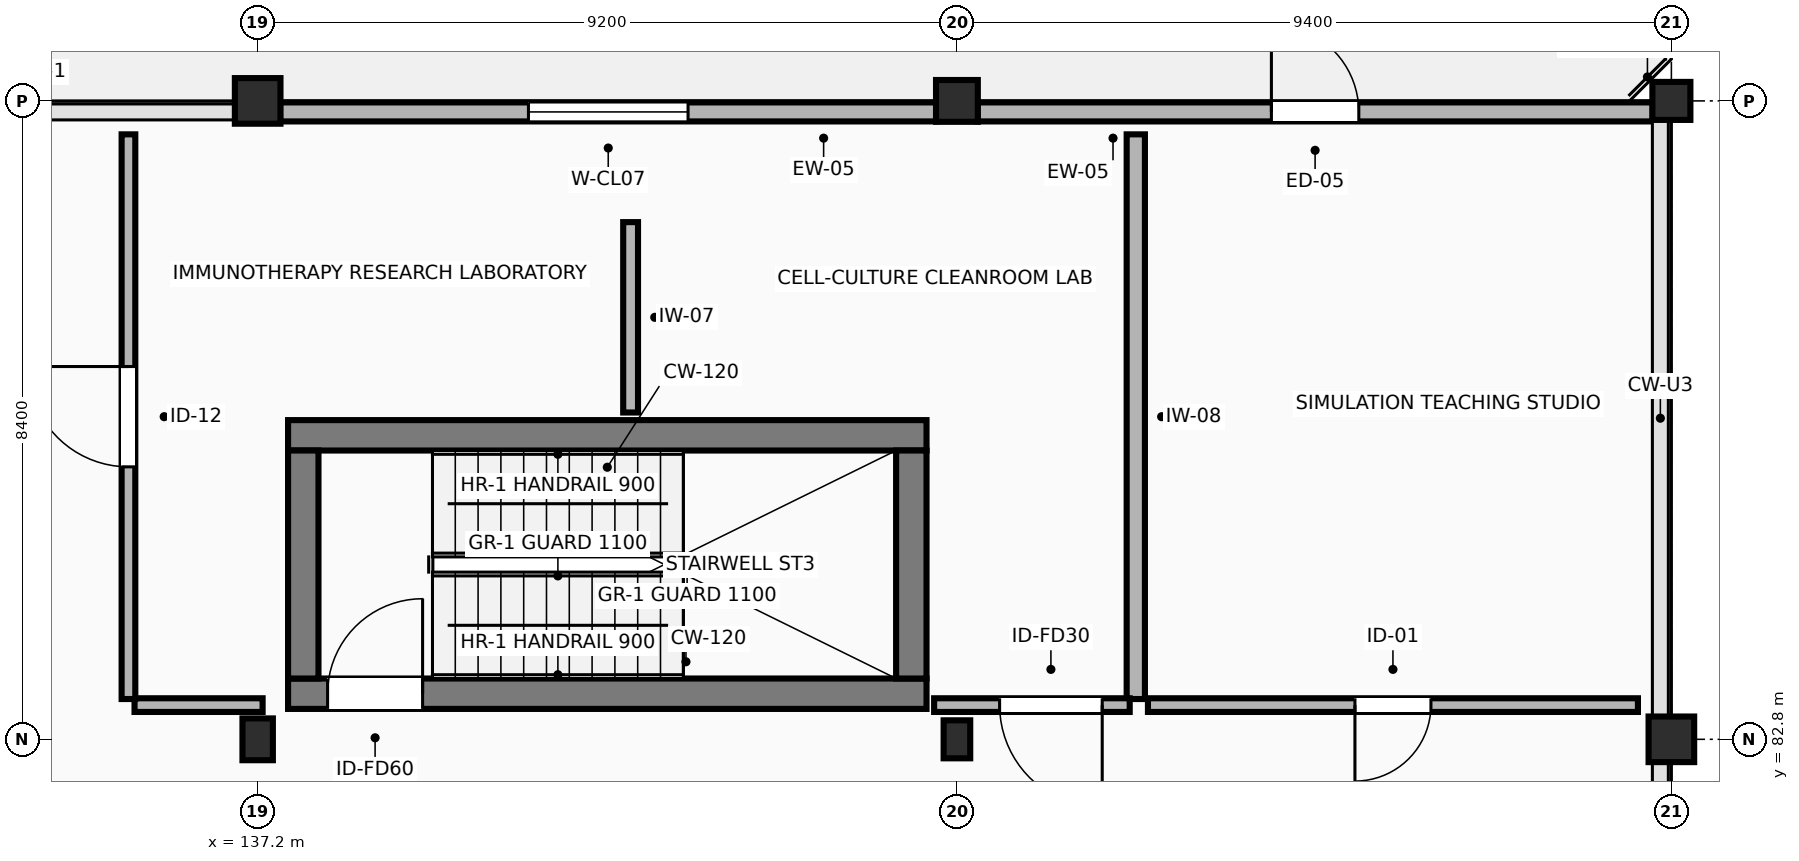
"""IFC4 building model, lengths in metres.
Left out: names, types, materials, properties, quantities, classifications, styles, units other than length and angle.
Written with IfcOpenShell. Run it as: python <this file> out.ifc"""

import sys

from ifc_helpers import new_model, si_unit, direction, frame, frame_2d, origin, origin_2d, place, context, subcontext, project, spatial, rectangle, extrude, element, fill, save


model = new_model("IFC4")
c1 = context("Model", 3, precision=1e-05, world=origin(), true_north=direction((0.0, 1.0)))
c2 = subcontext(c1, "Body", "Model", "MODEL_VIEW")
j1 = project(units=[si_unit("LENGTHUNIT", "METRE"), si_unit("PLANEANGLEUNIT", "RADIAN")], contexts=[c1])
p1 = place(None, origin())
s1 = spatial("IfcSite", under=j1, at=p1, CompositionType="ELEMENT")
p2 = place(p1, origin())
s2 = spatial("IfcBuilding", under=s1, at=p2, CompositionType="ELEMENT")
p3 = place(p2, frame((0.0, 0.0, 9.6)))
s3 = spatial("IfcBuildingStorey", under=s2, at=p3, CompositionType="ELEMENT", Elevation=9.6)
p4 = place(p3, frame((137.2, 82.8, 0.0), z_axis=(0.0, 0.0, 1.0), x_axis=(1.0, 0.0, 0.0)))
e1 = element("IfcColumn", 1, at=p4, inside=s3, PredefinedType="COLUMN", context=c2, shape_type="SweptSolid", body=[
    extrude(rectangle(XDim=0.4, YDim=0.55, at=origin_2d()), origin(), (0.0, 0.0, 1.0), 4.2),
])
p5 = place(p3, frame((137.2, 91.2, 0.0), z_axis=(0.0, 0.0, 1.0), x_axis=(1.0, 0.0, 0.0)))
e2 = element("IfcColumn", 2, at=p5, inside=s3, PredefinedType="COLUMN", context=c2, shape_type="SweptSolid", body=[
    extrude(rectangle(XDim=0.6, YDim=0.6, at=origin_2d()), origin(), (0.0, 0.0, 1.0), 4.2),
])
p6 = place(p3, frame((146.4, 82.8, 0.0), z_axis=(0.0, 0.0, 1.0), x_axis=(1.0, 0.0, 0.0)))
e3 = element("IfcColumn", 3, at=p6, inside=s3, PredefinedType="COLUMN", context=c2, shape_type="SweptSolid", body=[
    extrude(rectangle(XDim=0.35, YDim=0.5, at=origin_2d()), origin(), (0.0, 0.0, 1.0), 4.2),
])
p7 = place(p3, frame((146.4, 91.2, 0.0), z_axis=(0.0, 0.0, 1.0), x_axis=(1.0, 0.0, 0.0)))
e4 = element("IfcColumn", 4, at=p7, inside=s3, PredefinedType="COLUMN", context=c2, shape_type="SweptSolid", body=[
    extrude(rectangle(XDim=0.55, YDim=0.55, at=origin_2d()), origin(), (0.0, 0.0, 1.0), 4.2),
])
p8 = place(p3, frame((155.8, 82.8, 0.0), z_axis=(0.0, 0.0, 1.0), x_axis=(1.0, 0.0, 0.0)))
e5 = element("IfcColumn", 5, at=p8, inside=s3, PredefinedType="COLUMN", context=c2, shape_type="SweptSolid", body=[
    extrude(rectangle(XDim=0.6, YDim=0.6, at=origin_2d()), origin(), (0.0, 0.0, 1.0), 4.2),
])
p9 = place(p3, frame((155.8, 91.2, 0.0), z_axis=(0.0, 0.0, 1.0), x_axis=(1.0, 0.0, 0.0)))
e6 = element("IfcColumn", 6, at=p9, inside=s3, PredefinedType="COLUMN", context=c2, shape_type="SweptSolid", body=[
    extrude(rectangle(XDim=0.5, YDim=0.5, at=origin_2d()), origin(), (0.0, 0.0, 1.0), 4.2),
])
p10 = place(p3, frame((155.555, 91.055, 0.0), z_axis=(0.0, 0.0, 1.0), x_axis=(-1.0, 0.0, 0.0)))
e7 = element("IfcWall", 7, at=p10, inside=s3, PredefinedType="STANDARD", context=c2, shape_type="SweptSolid", body=[
    extrude(rectangle(XDim=8.885, YDim=0.25, at=frame_2d((4.442, 0.0))), origin(), (0.0, 0.0, 1.0), 3.185),
])
p11 = place(p10, frame((3.867, 0.0, 0.0)))
e8 = element("IfcOpeningElement", 8, at=p11, cuts=e7, PredefinedType="OPENING", context=c2, shape_type="SweptSolid", body=[
    extrude(rectangle(XDim=1.15, YDim=2.2, at=frame_2d((0.575, 1.1))), frame((0.0, 0.135, 0.0), z_axis=(0.0, -1.0, 0.0), x_axis=(1.0, 0.0, 0.0)), (0.0, 0.0, 1.0), 0.27),
])
p12 = place(p3, frame((146.13, 91.055, 0.0), z_axis=(0.0, 0.0, 1.0), x_axis=(-1.0, 0.0, 0.0)))
e9 = element("IfcWall", 9, at=p12, inside=s3, PredefinedType="STANDARD", context=c2, shape_type="SweptSolid", body=[
    extrude(rectangle(XDim=8.635, YDim=0.25, at=frame_2d((4.317, 0.0))), origin(), (0.0, 0.0, 1.0), 3.215),
])
p13 = place(p12, frame((3.268, 0.0, 0.95)))
e10 = element("IfcOpeningElement", 10, at=p13, cuts=e9, PredefinedType="OPENING", context=c2, shape_type="SweptSolid", body=[
    extrude(rectangle(XDim=2.1, YDim=1.8, at=frame_2d((1.05, 0.9))), frame((0.0, 0.135, 0.0), z_axis=(0.0, -1.0, 0.0), x_axis=(1.0, 0.0, 0.0)), (0.0, 0.0, 1.0), 0.27),
])
p14 = place(p3, frame((137.6, 83.4, 0.0), z_axis=(0.0, 0.0, 1.0), x_axis=(1.0, 0.0, 0.0)))
e11 = element("IfcWall", 11, at=p14, inside=s3, PredefinedType="SHEAR", context=c2, shape_type="SweptSolid", body=[
    extrude(rectangle(XDim=8.4, YDim=0.4, at=frame_2d((4.2, 0.0))), origin(), (0.0, 0.0, 1.0), 3.92),
])
p15 = place(p14, frame((0.52, 0.0, 0.0)))
e12 = element("IfcOpeningElement", 12, at=p15, cuts=e11, PredefinedType="OPENING", context=c2, shape_type="SweptSolid", body=[
    extrude(rectangle(XDim=1.25, YDim=2.2, at=frame_2d((0.625, 1.1))), frame((0.0, 0.21, 0.0), z_axis=(0.0, -1.0, 0.0), x_axis=(1.0, 0.0, 0.0)), (0.0, 0.0, 1.0), 0.42),
])
p16 = place(p3, frame((146.0, 86.8, 0.0), z_axis=(0.0, 0.0, 1.0), x_axis=(-1.0, 0.0, 0.0)))
e13 = element("IfcWall", 13, at=p16, inside=s3, PredefinedType="SHEAR", context=c2, shape_type="SweptSolid", body=[
    extrude(rectangle(XDim=8.4, YDim=0.4, at=frame_2d((4.2, 0.0))), origin(), (0.0, 0.0, 1.0), 3.92),
])
for number, where, z_axis, x_axis in (
    (14, (137.8, 83.6, 0.0), (0.0, 0.0, 1.0), (0.0, 1.0, 0.0)),
    (15, (145.8, 86.6, 0.0), (0.0, 0.0, 1.0), (0.0, -1.0, 0.0)),
):
    element("IfcWall", number, at=place(p3, frame(where, z_axis=z_axis, x_axis=x_axis)), inside=s3, PredefinedType="SHEAR", context=c2, shape_type="SweptSolid", body=[
        extrude(rectangle(XDim=3.0, YDim=0.4, at=frame_2d((1.5, 0.0))), origin(), (0.0, 0.0, 1.0), 3.92),
    ])
p17 = place(p3, frame((137.265, 83.25, 0.0), z_axis=(0.0, 0.0, 1.0), x_axis=(-1.0, 0.0, 0.0)))
e16 = element("IfcWall", 16, at=p17, inside=s3, PredefinedType="PARTITIONING", context=c2, shape_type="SweptSolid", body=[
    extrude(rectangle(XDim=1.685, YDim=0.18, at=frame_2d((0.842, 0.0))), origin(), (0.0, 0.0, 1.0), 3.255),
])
p18 = place(p3, frame((135.5, 83.33, 0.0), z_axis=(0.0, 0.0, 1.0), x_axis=(0.0, 1.0, 0.0)))
e17 = element("IfcWall", 17, at=p18, inside=s3, PredefinedType="PARTITIONING", context=c2, shape_type="SweptSolid", body=[
    extrude(rectangle(XDim=7.43, YDim=0.18, at=frame_2d((3.715, 0.0))), origin(), (0.0, 0.0, 1.0), 3.92),
])
p19 = place(p18, frame((3.055, 0.0, 0.0)))
e18 = element("IfcOpeningElement", 18, at=p19, cuts=e17, PredefinedType="OPENING", context=c2, shape_type="SweptSolid", body=[
    extrude(rectangle(XDim=1.32, YDim=2.22, at=frame_2d((0.66, 1.11))), frame((0.0, 0.1, 0.0), z_axis=(0.0, -1.0, 0.0), x_axis=(1.0, 0.0, 0.0)), (0.0, 0.0, 1.0), 0.2),
])
p20 = place(p3, frame((142.107, 89.605, 0.0), z_axis=(0.0, 0.0, 1.0), x_axis=(0.0, -1.0, 0.0)))
e19 = element("IfcWall", 19, at=p20, inside=s3, PredefinedType="PARTITIONING", context=c2, shape_type="SweptSolid", body=[
    extrude(rectangle(XDim=2.505, YDim=0.195, at=frame_2d((1.252, 0.0))), origin(), (0.0, 0.0, 1.0), 3.92),
])
p21 = place(p3, frame((148.753, 90.76, 0.0), z_axis=(0.0, 0.0, 1.0), x_axis=(0.0, -1.0, 0.0)))
e20 = element("IfcWall", 20, at=p21, inside=s3, PredefinedType="PARTITIONING", context=c2, shape_type="SweptSolid", body=[
    extrude(rectangle(XDim=7.43, YDim=0.24, at=frame_2d((3.715, 0.0))), origin(), (0.0, 0.0, 1.0), 3.92),
])
p22 = place(p3, frame((148.673, 83.25, 0.0), z_axis=(0.0, 0.0, 1.0), x_axis=(-1.0, 0.0, 0.0)))
e21 = element("IfcWall", 21, at=p22, inside=s3, PredefinedType="PARTITIONING", context=c2, shape_type="SweptSolid", body=[
    extrude(rectangle(XDim=2.573, YDim=0.18, at=frame_2d((1.287, 0.0))), origin(), (0.0, 0.0, 1.0), 3.225),
])
p23 = place(p22, frame((0.362, 0.0, 0.0)))
e22 = element("IfcOpeningElement", 22, at=p23, cuts=e21, PredefinedType="OPENING", context=c2, shape_type="SweptSolid", body=[
    extrude(rectangle(XDim=1.35, YDim=2.2, at=frame_2d((0.675, 1.1))), frame((0.0, 0.1, 0.0), z_axis=(0.0, -1.0, 0.0), x_axis=(1.0, 0.0, 0.0)), (0.0, 0.0, 1.0), 0.2),
])
p24 = place(p3, frame((155.36, 83.25, 0.0), z_axis=(0.0, 0.0, 1.0), x_axis=(-1.0, 0.0, 0.0)))
e23 = element("IfcWall", 23, at=p24, inside=s3, PredefinedType="PARTITIONING", context=c2, shape_type="SweptSolid", body=[
    extrude(rectangle(XDim=6.447, YDim=0.18, at=frame_2d((3.223, 0.0))), origin(), (0.0, 0.0, 1.0), 3.225),
])
p25 = place(p24, frame((2.723, 0.0, 0.0)))
e24 = element("IfcOpeningElement", 24, at=p25, cuts=e23, PredefinedType="OPENING", context=c2, shape_type="SweptSolid", body=[
    extrude(rectangle(XDim=1.0, YDim=2.15, at=frame_2d((0.5, 1.075))), frame((0.0, 0.1, 0.0), z_axis=(0.0, -1.0, 0.0), x_axis=(1.0, 0.0, 0.0)), (0.0, 0.0, 1.0), 0.2),
])
p26 = place(p11, frame((1.15, 0.0, 0.0), z_axis=(0.0, 0.0, 1.0), x_axis=(-1.0, 0.0, 0.0)))
e25 = element("IfcDoor", 25, at=p26, inside=s3, OperationType="SINGLE_SWING_LEFT", PredefinedType="DOOR", context=c2, shape_type="SweptSolid", body=[
    extrude(rectangle(XDim=1.15, YDim=2.2, at=frame_2d((0.575, 1.1))), frame((0.0, 0.025, 0.0), z_axis=(0.0, -1.0, 0.0), x_axis=(1.0, 0.0, 0.0)), (0.0, 0.0, 1.0), 0.05),
])
fill(e8, e25)
p27 = place(p13, origin())
e26 = element("IfcWindow", 26, at=p27, inside=s3, PartitioningType="SINGLE_PANEL", PredefinedType="WINDOW", context=c2, shape_type="SweptSolid", body=[
    extrude(rectangle(XDim=2.1, YDim=1.8, at=frame_2d((1.05, 0.9))), frame((0.0, 0.03, 0.0), z_axis=(0.0, -1.0, 0.0), x_axis=(1.0, 0.0, 0.0)), (0.0, 0.0, 1.0), 0.06),
])
fill(e10, e26)
p28 = place(p15, origin())
e27 = element("IfcDoor", 27, at=p28, inside=s3, OperationType="SINGLE_SWING_RIGHT", PredefinedType="DOOR", context=c2, shape_type="SweptSolid", body=[
    extrude(rectangle(XDim=1.25, YDim=2.2, at=frame_2d((0.625, 1.1))), frame((0.0, 0.025, 0.0), z_axis=(0.0, -1.0, 0.0), x_axis=(1.0, 0.0, 0.0)), (0.0, 0.0, 1.0), 0.05),
])
fill(e12, e27)
p29 = place(p19, origin())
e28 = element("IfcDoor", 28, at=p29, inside=s3, OperationType="SINGLE_SWING_RIGHT", PredefinedType="DOOR", context=c2, shape_type="SweptSolid", body=[
    extrude(rectangle(XDim=1.32, YDim=2.22, at=frame_2d((0.66, 1.11))), frame((0.0, 0.025, 0.0), z_axis=(0.0, -1.0, 0.0), x_axis=(1.0, 0.0, 0.0)), (0.0, 0.0, 1.0), 0.05),
])
fill(e18, e28)
p30 = place(p23, origin())
e29 = element("IfcDoor", 29, at=p30, inside=s3, OperationType="SINGLE_SWING_LEFT", PredefinedType="DOOR", context=c2, shape_type="SweptSolid", body=[
    extrude(rectangle(XDim=1.35, YDim=2.2, at=frame_2d((0.675, 1.1))), frame((0.0, 0.025, 0.0), z_axis=(0.0, -1.0, 0.0), x_axis=(1.0, 0.0, 0.0)), (0.0, 0.0, 1.0), 0.05),
])
fill(e22, e29)
p31 = place(p25, origin())
e30 = element("IfcDoor", 30, at=p31, inside=s3, OperationType="SINGLE_SWING_RIGHT", PredefinedType="DOOR", context=c2, shape_type="SweptSolid", body=[
    extrude(rectangle(XDim=1.0, YDim=2.15, at=frame_2d((0.5, 1.075))), frame((0.0, 0.025, 0.0), z_axis=(0.0, -1.0, 0.0), x_axis=(1.0, 0.0, 0.0)), (0.0, 0.0, 1.0), 0.05),
])
fill(e24, e30)
save(model, sys.argv[1])
